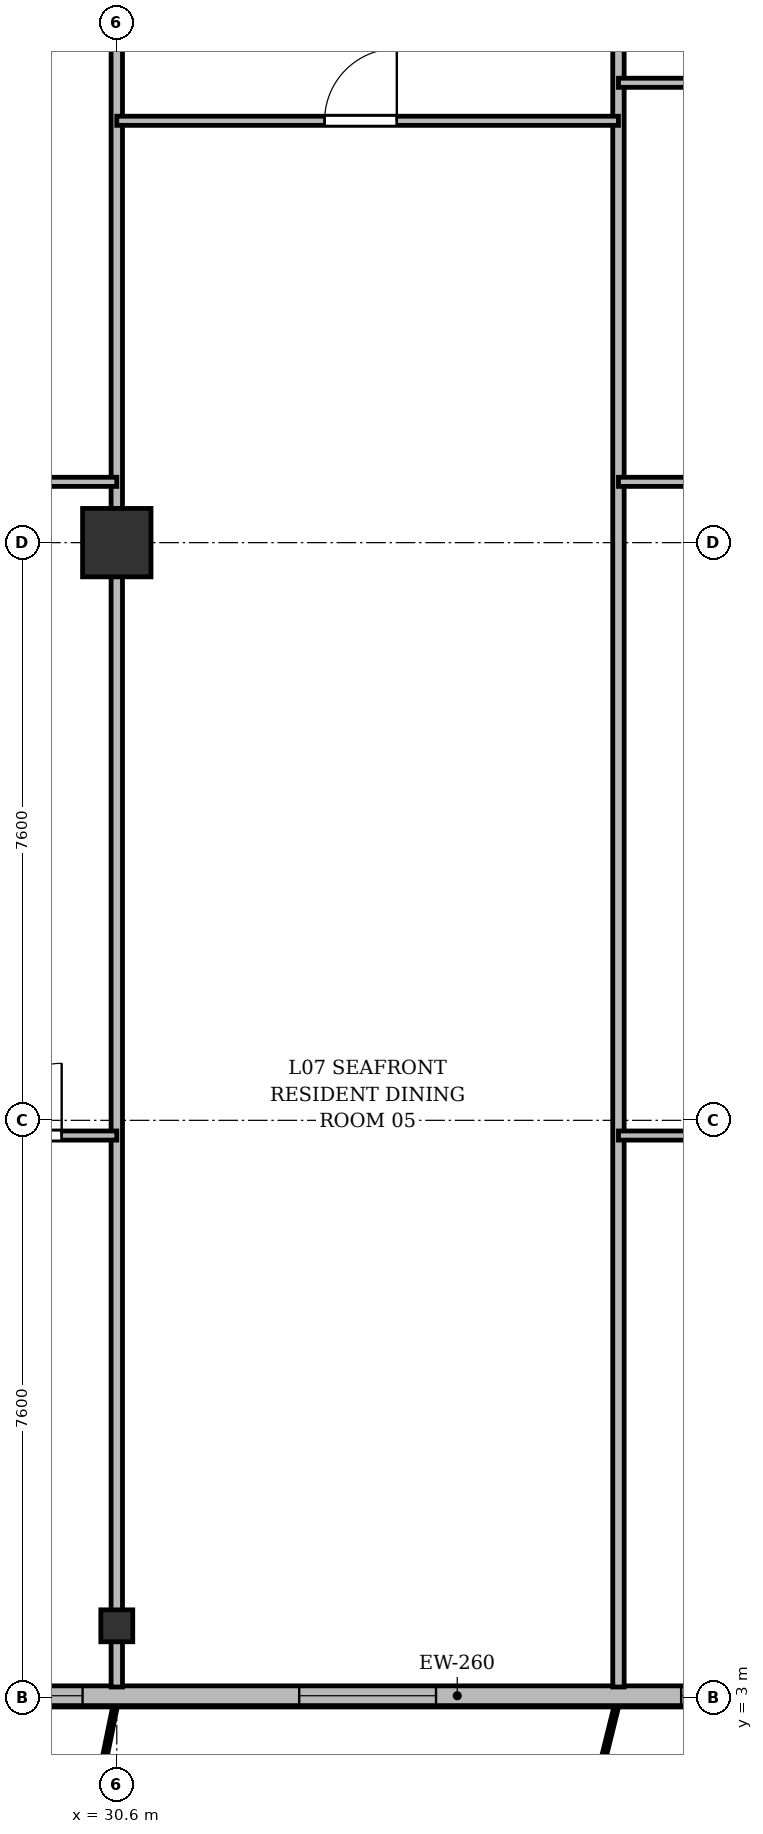
"""IFC4 building model, lengths in metres.
Left out: names, types, materials, properties, quantities, classifications, styles, units other than length and angle.
Written with IfcOpenShell. Run it as: python <this file> out.ifc"""

import sys

from ifc_helpers import new_model, si_unit, direction, frame, frame_2d, origin, origin_2d, place, context, subcontext, project, spatial, rectangle, i_section, extrude, source, transform, mapped, element, fill, save


model = new_model("IFC4")
c1 = context("Model", 3, precision=1e-05, world=origin(), true_north=direction((0.0, 1.0)))
c2 = subcontext(c1, "Body", "Model", "MODEL_VIEW")
j1 = project(units=[si_unit("LENGTHUNIT", "METRE"), si_unit("PLANEANGLEUNIT", "RADIAN")], contexts=[c1])
p1 = place(None, origin())
s1 = spatial("IfcSite", under=j1, at=p1, CompositionType="ELEMENT")
p2 = place(p1, origin())
s2 = spatial("IfcBuilding", under=s1, at=p2, CompositionType="ELEMENT")
p3 = place(p2, frame((0.0, 0.0, 30.7)))
s3 = spatial("IfcBuildingStorey", under=s2, at=p3, CompositionType="ELEMENT", Elevation=30.7)
m1 = source(origin(), c2, "Body", "SweptSolid", [
    extrude(i_section(OverallWidth=0.42, OverallDepth=0.42, WebThickness=0.026, FlangeThickness=0.04, at=origin_2d()), origin(), (0.0, 0.0, 1.0), 3.6),
])
p4 = place(p3, frame((30.6, 3.95, 0.0), z_axis=(0.0, 0.0, 1.0), x_axis=(1.0, 0.0, 0.0)))
e1 = element("IfcColumn", 1, at=p4, inside=s3, PredefinedType="COLUMN", context=c2, shape_type="MappedRepresentation", body=[
    mapped(m1, transform((0.0, 0.0, 0.0), x_axis=(1.0, 0.0, 0.0), y_axis=(0.0, 1.0, 0.0), z_axis=(0.0, 0.0, 1.0), scale=1.0)),
])
m2 = source(origin(), c2, "Body", "SweptSolid", [
    extrude(rectangle(XDim=0.9, YDim=0.9, at=origin_2d()), origin(), (0.0, 0.0, 1.0), 3.6),
])
p5 = place(p3, frame((30.6, 18.2, 0.0), z_axis=(0.0, 0.0, 1.0), x_axis=(1.0, 0.0, 0.0)))
e2 = element("IfcColumn", 2, at=p5, inside=s3, PredefinedType="COLUMN", context=c2, shape_type="MappedRepresentation", body=[
    mapped(m2, transform((0.0, 0.0, 0.0), x_axis=(1.0, 0.0, 0.0), y_axis=(0.0, 1.0, 0.0), z_axis=(0.0, 0.0, 1.0), scale=1.0)),
])
p6 = place(p3, frame((66.9, 3.03, 0.0), z_axis=(0.0, 0.0, 1.0), x_axis=(-1.0, 0.0, 0.0)))
e3 = element("IfcWall", 3, at=p6, inside=s3, PredefinedType="SOLIDWALL", context=c2, shape_type="SweptSolid", body=[
    extrude(rectangle(XDim=59.4, YDim=0.26, at=frame_2d((29.7, 0.0))), origin(), (0.0, 0.0, 1.0), 3.34),
])
p7 = place(p6, frame((3.7, 0.0, 0.9)))
e4 = element("IfcOpeningElement", 4, at=p7, cuts=e3, PredefinedType="OPENING", context=c2, shape_type="SweptSolid", body=[
    extrude(rectangle(XDim=2.0, YDim=1.95, at=frame_2d((1.0, 0.975))), frame((0.0, 0.14, 0.0), z_axis=(0.0, -1.0, 0.0), x_axis=(1.0, 0.0, 0.0)), (0.0, 0.0, 1.0), 0.28),
])
p8 = place(p6, frame((9.225, 0.0, 0.9)))
e5 = element("IfcOpeningElement", 5, at=p8, cuts=e3, PredefinedType="OPENING", context=c2, shape_type="SweptSolid", body=[
    extrude(rectangle(XDim=1.65, YDim=1.85, at=frame_2d((0.825, 0.925))), frame((0.0, 0.14, 0.0), z_axis=(0.0, -1.0, 0.0), x_axis=(1.0, 0.0, 0.0)), (0.0, 0.0, 1.0), 0.28),
])
p9 = place(p6, frame((13.05, 0.0, 0.9)))
e6 = element("IfcOpeningElement", 6, at=p9, cuts=e3, PredefinedType="OPENING", context=c2, shape_type="SweptSolid", body=[
    extrude(rectangle(XDim=1.8, YDim=1.8, at=frame_2d((0.9, 0.9))), frame((0.0, 0.14, 0.0), z_axis=(0.0, -1.0, 0.0), x_axis=(1.0, 0.0, 0.0)), (0.0, 0.0, 1.0), 0.28),
])
p10 = place(p6, frame((17.007, 0.0, 0.0)))
e7 = element("IfcOpeningElement", 7, at=p10, cuts=e3, PredefinedType="OPENING", context=c2, shape_type="SweptSolid", body=[
    extrude(rectangle(XDim=1.2, YDim=2.2, at=frame_2d((0.6, 1.1))), frame((0.0, 0.14, 0.0), z_axis=(0.0, -1.0, 0.0), x_axis=(1.0, 0.0, 0.0)), (0.0, 0.0, 1.0), 0.28),
])
p11 = place(p6, frame((20.55, 0.0, 0.9)))
e8 = element("IfcOpeningElement", 8, at=p11, cuts=e3, PredefinedType="OPENING", context=c2, shape_type="SweptSolid", body=[
    extrude(rectangle(XDim=1.5, YDim=1.75, at=frame_2d((0.75, 0.875))), frame((0.0, 0.14, 0.0), z_axis=(0.0, -1.0, 0.0), x_axis=(1.0, 0.0, 0.0)), (0.0, 0.0, 1.0), 0.28),
])
p12 = place(p6, frame((23.75, 0.0, 0.9)))
e9 = element("IfcOpeningElement", 9, at=p12, cuts=e3, PredefinedType="OPENING", context=c2, shape_type="SweptSolid", body=[
    extrude(rectangle(XDim=2.0, YDim=1.95, at=frame_2d((1.0, 0.975))), frame((0.0, 0.14, 0.0), z_axis=(0.0, -1.0, 0.0), x_axis=(1.0, 0.0, 0.0)), (0.0, 0.0, 1.0), 0.28),
])
p13 = place(p6, frame((27.225, 0.0, 0.9)))
e10 = element("IfcOpeningElement", 10, at=p13, cuts=e3, PredefinedType="OPENING", context=c2, shape_type="SweptSolid", body=[
    extrude(rectangle(XDim=1.65, YDim=1.85, at=frame_2d((0.825, 0.925))), frame((0.0, 0.14, 0.0), z_axis=(0.0, -1.0, 0.0), x_axis=(1.0, 0.0, 0.0)), (0.0, 0.0, 1.0), 0.28),
])
p14 = place(p6, frame((32.1, 0.0, 0.9)))
e11 = element("IfcOpeningElement", 11, at=p14, cuts=e3, PredefinedType="OPENING", context=c2, shape_type="SweptSolid", body=[
    extrude(rectangle(XDim=1.8, YDim=1.8, at=frame_2d((0.9, 0.9))), frame((0.0, 0.14, 0.0), z_axis=(0.0, -1.0, 0.0), x_axis=(1.0, 0.0, 0.0)), (0.0, 0.0, 1.0), 0.28),
])
p15 = place(p6, frame((36.75, 0.0, 0.9)))
e12 = element("IfcOpeningElement", 12, at=p15, cuts=e3, PredefinedType="OPENING", context=c2, shape_type="SweptSolid", body=[
    extrude(rectangle(XDim=1.5, YDim=1.75, at=frame_2d((0.75, 0.875))), frame((0.0, 0.14, 0.0), z_axis=(0.0, -1.0, 0.0), x_axis=(1.0, 0.0, 0.0)), (0.0, 0.0, 1.0), 0.28),
])
p16 = place(p6, frame((39.15, 0.0, 0.9)))
e13 = element("IfcOpeningElement", 13, at=p16, cuts=e3, PredefinedType="OPENING", context=c2, shape_type="SweptSolid", body=[
    extrude(rectangle(XDim=1.5, YDim=1.75, at=frame_2d((0.75, 0.875))), frame((0.0, 0.14, 0.0), z_axis=(0.0, -1.0, 0.0), x_axis=(1.0, 0.0, 0.0)), (0.0, 0.0, 1.0), 0.28),
])
p17 = place(p6, frame((41.3, 0.0, 0.9)))
e14 = element("IfcOpeningElement", 14, at=p17, cuts=e3, PredefinedType="OPENING", context=c2, shape_type="SweptSolid", body=[
    extrude(rectangle(XDim=2.0, YDim=1.95, at=frame_2d((1.0, 0.975))), frame((0.0, 0.14, 0.0), z_axis=(0.0, -1.0, 0.0), x_axis=(1.0, 0.0, 0.0)), (0.0, 0.0, 1.0), 0.28),
])
p18 = place(p6, frame((45.435, 0.0, 0.0)))
e15 = element("IfcOpeningElement", 15, at=p18, cuts=e3, PredefinedType="OPENING", context=c2, shape_type="SweptSolid", body=[
    extrude(rectangle(XDim=1.2, YDim=2.2, at=frame_2d((0.6, 1.1))), frame((0.0, 0.14, 0.0), z_axis=(0.0, -1.0, 0.0), x_axis=(1.0, 0.0, 0.0)), (0.0, 0.0, 1.0), 0.28),
])
p19 = place(p6, frame((48.45, 0.0, 0.9)))
e16 = element("IfcOpeningElement", 16, at=p19, cuts=e3, PredefinedType="OPENING", context=c2, shape_type="SweptSolid", body=[
    extrude(rectangle(XDim=1.8, YDim=1.8, at=frame_2d((0.9, 0.9))), frame((0.0, 0.14, 0.0), z_axis=(0.0, -1.0, 0.0), x_axis=(1.0, 0.0, 0.0)), (0.0, 0.0, 1.0), 0.28),
])
p20 = place(p6, frame((51.9, 0.0, 0.9)))
e17 = element("IfcOpeningElement", 17, at=p20, cuts=e3, PredefinedType="OPENING", context=c2, shape_type="SweptSolid", body=[
    extrude(rectangle(XDim=2.2, YDim=1.8, at=frame_2d((1.1, 0.9))), frame((0.0, 0.14, 0.0), z_axis=(0.0, -1.0, 0.0), x_axis=(1.0, 0.0, 0.0)), (0.0, 0.0, 1.0), 0.28),
])
p21 = place(p6, frame((55.65, 0.0, 0.9)))
e18 = element("IfcOpeningElement", 18, at=p21, cuts=e3, PredefinedType="OPENING", context=c2, shape_type="SweptSolid", body=[
    extrude(rectangle(XDim=1.5, YDim=1.75, at=frame_2d((0.75, 0.875))), frame((0.0, 0.14, 0.0), z_axis=(0.0, -1.0, 0.0), x_axis=(1.0, 0.0, 0.0)), (0.0, 0.0, 1.0), 0.28),
])
p22 = place(p3, frame((30.6, 3.145, 0.0), z_axis=(0.0, 0.0, 1.0), x_axis=(0.0, 1.0, 0.0)))
e19 = element("IfcWall", 19, at=p22, inside=s3, PredefinedType="PARTITIONING", context=c2, shape_type="SweptSolid", body=[
    extrude(rectangle(XDim=24.455, YDim=0.15, at=frame_2d((12.228, 0.0))), origin(), (0.0, 0.0, 1.0), 2.752),
])
p23 = place(p3, frame((37.2, 3.145, 0.0), z_axis=(0.0, 0.0, 1.0), x_axis=(0.0, 1.0, 0.0)))
e20 = element("IfcWall", 20, at=p23, inside=s3, PredefinedType="PARTITIONING", context=c2, shape_type="SweptSolid", body=[
    extrude(rectangle(XDim=24.455, YDim=0.15, at=frame_2d((12.228, 0.0))), origin(), (0.0, 0.0, 1.0), 2.69),
])
p24 = place(p3, frame((23.4, 19.0, 0.0), z_axis=(0.0, 0.0, 1.0), x_axis=(1.0, 0.0, 0.0)))
e21 = element("IfcWall", 21, at=p24, inside=s3, PredefinedType="PARTITIONING", context=c2, shape_type="SweptSolid", body=[
    extrude(rectangle(XDim=7.2, YDim=0.12, at=frame_2d((3.6, 0.0))), origin(), (0.0, 0.0, 1.0), 2.752),
])
p25 = place(p24, frame((3.125, 0.0, 0.0)))
e22 = element("IfcOpeningElement", 22, at=p25, cuts=e21, PredefinedType="OPENING", context=c2, shape_type="SweptSolid", body=[
    extrude(rectangle(XDim=0.95, YDim=2.15, at=frame_2d((0.475, 1.075))), frame((0.0, 0.07, 0.0), z_axis=(0.0, -1.0, 0.0), x_axis=(1.0, 0.0, 0.0)), (0.0, 0.0, 1.0), 0.14),
])
p26 = place(p3, frame((28.2, 10.4, 0.0), z_axis=(0.0, 0.0, 1.0), x_axis=(1.0, 0.0, 0.0)))
e23 = element("IfcWall", 23, at=p26, inside=s3, PredefinedType="PARTITIONING", context=c2, shape_type="SweptSolid", body=[
    extrude(rectangle(XDim=2.4, YDim=0.12, at=frame_2d((1.2, 0.0))), origin(), (0.0, 0.0, 1.0), 2.752),
])
p27 = place(p26, frame((0.725, 0.0, 0.0)))
e24 = element("IfcOpeningElement", 24, at=p27, cuts=e23, PredefinedType="OPENING", context=c2, shape_type="SweptSolid", body=[
    extrude(rectangle(XDim=0.95, YDim=2.15, at=frame_2d((0.475, 1.075))), frame((0.0, 0.07, 0.0), z_axis=(0.0, -1.0, 0.0), x_axis=(1.0, 0.0, 0.0)), (0.0, 0.0, 1.0), 0.14),
])
p28 = place(p3, frame((30.6, 23.75, 0.0), z_axis=(0.0, 0.0, 1.0), x_axis=(1.0, 0.0, 0.0)))
e25 = element("IfcWall", 25, at=p28, inside=s3, PredefinedType="PARTITIONING", context=c2, shape_type="SweptSolid", body=[
    extrude(rectangle(XDim=6.6, YDim=0.12, at=frame_2d((3.3, 0.0))), origin(), (0.0, 0.0, 1.0), 2.752),
])
p29 = place(p28, frame((2.734, 0.0, 0.0)))
e26 = element("IfcOpeningElement", 26, at=p29, cuts=e25, PredefinedType="OPENING", context=c2, shape_type="SweptSolid", body=[
    extrude(rectangle(XDim=0.95, YDim=2.15, at=frame_2d((0.475, 1.075))), frame((0.0, 0.07, 0.0), z_axis=(0.0, -1.0, 0.0), x_axis=(1.0, 0.0, 0.0)), (0.0, 0.0, 1.0), 0.14),
])
p30 = place(p3, frame((37.2, 19.0, 0.0), z_axis=(0.0, 0.0, 1.0), x_axis=(1.0, 0.0, 0.0)))
e27 = element("IfcWall", 27, at=p30, inside=s3, PredefinedType="PARTITIONING", context=c2, shape_type="SweptSolid", body=[
    extrude(rectangle(XDim=6.6, YDim=0.12, at=frame_2d((3.3, 0.0))), origin(), (0.0, 0.0, 1.0), 2.752),
])
p31 = place(p30, frame((2.734, 0.0, 0.0)))
e28 = element("IfcOpeningElement", 28, at=p31, cuts=e27, PredefinedType="OPENING", context=c2, shape_type="SweptSolid", body=[
    extrude(rectangle(XDim=0.95, YDim=2.15, at=frame_2d((0.475, 1.075))), frame((0.0, 0.07, 0.0), z_axis=(0.0, -1.0, 0.0), x_axis=(1.0, 0.0, 0.0)), (0.0, 0.0, 1.0), 0.14),
])
p32 = place(p3, frame((37.2, 24.25, 0.0), z_axis=(0.0, 0.0, 1.0), x_axis=(1.0, 0.0, 0.0)))
e29 = element("IfcWall", 29, at=p32, inside=s3, PredefinedType="PARTITIONING", context=c2, shape_type="SweptSolid", body=[
    extrude(rectangle(XDim=2.294, YDim=0.12, at=frame_2d((1.147, 0.0))), origin(), (0.0, 0.0, 1.0), 3.34),
])
p33 = place(p3, frame((37.2, 10.4, 0.0), z_axis=(0.0, 0.0, 1.0), x_axis=(1.0, 0.0, 0.0)))
e30 = element("IfcWall", 30, at=p33, inside=s3, PredefinedType="PARTITIONING", context=c2, shape_type="SweptSolid", body=[
    extrude(rectangle(XDim=3.3, YDim=0.12, at=frame_2d((1.65, 0.0))), origin(), (0.0, 0.0, 1.0), 3.34),
])
p34 = place(p33, frame((1.175, 0.0, 0.0)))
e31 = element("IfcOpeningElement", 31, at=p34, cuts=e30, PredefinedType="OPENING", context=c2, shape_type="SweptSolid", body=[
    extrude(rectangle(XDim=0.95, YDim=2.15, at=frame_2d((0.475, 1.075))), frame((0.0, 0.07, 0.0), z_axis=(0.0, -1.0, 0.0), x_axis=(1.0, 0.0, 0.0)), (0.0, 0.0, 1.0), 0.14),
])
m3 = source(origin(), c2, "Body", "SweptSolid", [
    extrude(rectangle(XDim=1.65, YDim=1.85, at=frame_2d((0.825, 0.925))), frame((0.0, 0.03, 0.0), z_axis=(0.0, -1.0, 0.0), x_axis=(1.0, 0.0, 0.0)), (0.0, 0.0, 1.0), 0.06),
])
p35 = place(p13, origin())
e32 = element("IfcWindow", 32, at=p35, inside=s3, PartitioningType="SINGLE_PANEL", PredefinedType="WINDOW", context=c2, shape_type="MappedRepresentation", body=[
    mapped(m3, transform((0.0, 0.0, 0.0), x_axis=(1.0, 0.0, 0.0), y_axis=(0.0, 1.0, 0.0), z_axis=(0.0, 0.0, 1.0), scale=1.0)),
])
fill(e10, e32)
m4 = source(origin(), c2, "Body", "SweptSolid", [
    extrude(rectangle(XDim=1.8, YDim=1.8, at=frame_2d((0.9, 0.9))), frame((0.0, 0.03, 0.0), z_axis=(0.0, -1.0, 0.0), x_axis=(1.0, 0.0, 0.0)), (0.0, 0.0, 1.0), 0.06),
])
p36 = place(p14, origin())
e33 = element("IfcWindow", 33, at=p36, inside=s3, PartitioningType="SINGLE_PANEL", PredefinedType="WINDOW", context=c2, shape_type="MappedRepresentation", body=[
    mapped(m4, transform((0.0, 0.0, 0.0), x_axis=(1.0, 0.0, 0.0), y_axis=(0.0, 1.0, 0.0), z_axis=(0.0, 0.0, 1.0), scale=1.0)),
])
fill(e11, e33)
m5 = source(origin(), c2, "Body", "SweptSolid", [
    extrude(rectangle(XDim=1.5, YDim=1.75, at=frame_2d((0.75, 0.875))), frame((0.0, 0.03, 0.0), z_axis=(0.0, -1.0, 0.0), x_axis=(1.0, 0.0, 0.0)), (0.0, 0.0, 1.0), 0.06),
])
p37 = place(p15, origin())
e34 = element("IfcWindow", 34, at=p37, inside=s3, PartitioningType="SINGLE_PANEL", PredefinedType="WINDOW", context=c2, shape_type="MappedRepresentation", body=[
    mapped(m5, transform((0.0, 0.0, 0.0), x_axis=(1.0, 0.0, 0.0), y_axis=(0.0, 1.0, 0.0), z_axis=(0.0, 0.0, 1.0), scale=1.0)),
])
fill(e12, e34)
m6 = source(origin(), c2, "Body", "SweptSolid", [
    extrude(rectangle(XDim=0.95, YDim=2.15, at=frame_2d((0.475, 1.075))), frame((0.0, 0.025, 0.0), z_axis=(0.0, -1.0, 0.0), x_axis=(1.0, 0.0, 0.0)), (0.0, 0.0, 1.0), 0.05),
])
p38 = place(p27, origin())
e35 = element("IfcDoor", 35, at=p38, inside=s3, OperationType="SINGLE_SWING_RIGHT", PredefinedType="DOOR", context=c2, shape_type="MappedRepresentation", body=[
    mapped(m6, transform((0.0, 0.0, 0.0), x_axis=(1.0, 0.0, 0.0), y_axis=(0.0, 1.0, 0.0), z_axis=(0.0, 0.0, 1.0), scale=1.0)),
])
fill(e24, e35)
p39 = place(p29, origin())
e36 = element("IfcDoor", 36, at=p39, inside=s3, OperationType="SINGLE_SWING_RIGHT", PredefinedType="DOOR", context=c2, shape_type="MappedRepresentation", body=[
    mapped(m6, transform((0.0, 0.0, 0.0), x_axis=(1.0, 0.0, 0.0), y_axis=(0.0, 1.0, 0.0), z_axis=(0.0, 0.0, 1.0), scale=1.0)),
])
fill(e26, e36)
save(model, sys.argv[1])
